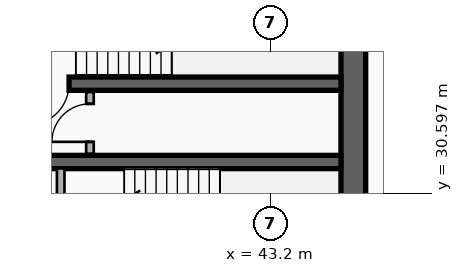
"""IFC4 building model, lengths in metres.
Left out: names, types, materials, properties, quantities, classifications, styles, units other than length and angle.
Written with IfcOpenShell. Run it as: python <this file> out.ifc"""

import sys

from ifc_helpers import new_model, si_unit, direction, frame, frame_2d, origin, place, context, subcontext, project, spatial, rectangle, extrude, element, fill, save


model = new_model("IFC4")
c1 = context("Model", 3, precision=1e-05, world=origin(), true_north=direction((0.0, 1.0)))
c2 = subcontext(c1, "Body", "Model", "MODEL_VIEW")
j1 = project(units=[si_unit("LENGTHUNIT", "METRE"), si_unit("PLANEANGLEUNIT", "RADIAN")], contexts=[c1])
p1 = place(None, origin())
s1 = spatial("IfcSite", under=j1, at=p1, CompositionType="ELEMENT")
p2 = place(p1, origin())
s2 = spatial("IfcBuilding", under=s1, at=p2, CompositionType="ELEMENT")
p3 = place(p2, frame((0.0, 0.0, 118.8)))
s3 = spatial("IfcBuildingStorey", under=s2, at=p3, CompositionType="ELEMENT", Elevation=118.8)
p4 = place(p3, frame((45.38, 28.145, 0.0), z_axis=(0.0, 0.0, 1.0), x_axis=(0.0, 1.0, 0.0)))
e1 = element("IfcWall", 1, at=p4, inside=s3, PredefinedType="SHEAR", context=c2, shape_type="SweptSolid", body=[
    extrude(rectangle(XDim=8.58, YDim=0.65, at=frame_2d((4.29, 0.0))), origin(), (0.0, 0.0, 1.0), 3.5),
])
p5 = place(p3, frame((45.055, 33.48, 0.0), z_axis=(0.0, 0.0, 1.0), x_axis=(-1.0, 0.0, 0.0)))
e2 = element("IfcWall", 2, at=p5, inside=s3, PredefinedType="SHEAR", context=c2, shape_type="SweptSolid", body=[
    extrude(rectangle(XDim=8.5, YDim=0.35, at=frame_2d((4.25, 0.0))), origin(), (0.0, 0.0, 1.0), 3.5),
])
p6 = place(p5, frame((7.155, 0.0, 0.0)))
e3 = element("IfcOpeningElement", 3, at=p6, cuts=e2, PredefinedType="OPENING", context=c2, shape_type="SweptSolid", body=[
    extrude(rectangle(XDim=1.1, YDim=2.15, at=frame_2d((0.55, 1.075))), frame((0.0, 0.185, 0.0), z_axis=(0.0, -1.0, 0.0), x_axis=(1.0, 0.0, 0.0)), (0.0, 0.0, 1.0), 0.37),
])
p7 = place(p3, frame((36.555, 31.42, 0.0), z_axis=(0.0, 0.0, 1.0), x_axis=(1.0, 0.0, 0.0)))
e4 = element("IfcWall", 4, at=p7, inside=s3, PredefinedType="SHEAR", context=c2, shape_type="SweptSolid", body=[
    extrude(rectangle(XDim=8.5, YDim=0.35, at=frame_2d((4.25, 0.0))), origin(), (0.0, 0.0, 1.0), 3.5),
])
p8 = place(p3, frame((37.68, 28.145, 0.0), z_axis=(0.0, 0.0, 1.0), x_axis=(0.0, 1.0, 0.0)))
e5 = element("IfcWall", 5, at=p8, inside=s3, PredefinedType="PARTITIONING", context=c2, shape_type="SweptSolid", body=[
    extrude(rectangle(XDim=3.105, YDim=0.2, at=frame_2d((1.552, 0.0))), origin(), (0.0, 0.0, 1.0), 2.62),
])
p9 = place(p3, frame((38.45, 31.64, 0.0), z_axis=(0.0, 0.0, 1.0), x_axis=(0.0, 1.0, 0.0)))
e6 = element("IfcWall", 6, at=p9, inside=s3, PredefinedType="PARTITIONING", context=c2, shape_type="SweptSolid", body=[
    extrude(rectangle(XDim=1.62, YDim=0.2, at=frame_2d((0.81, 0.0))), origin(), (0.0, 0.0, 1.0), 3.24),
])
p10 = place(p9, frame((0.31, 0.0, 0.0)))
e7 = element("IfcOpeningElement", 7, at=p10, cuts=e6, PredefinedType="OPENING", context=c2, shape_type="SweptSolid", body=[
    extrude(rectangle(XDim=1.0, YDim=2.15, at=frame_2d((0.5, 1.075))), frame((0.0, 0.11, 0.0), z_axis=(0.0, -1.0, 0.0), x_axis=(1.0, 0.0, 0.0)), (0.0, 0.0, 1.0), 0.22),
])
p11 = place(p6, origin())
e8 = element("IfcDoor", 8, at=p11, inside=s3, OperationType="SINGLE_SWING_RIGHT", PredefinedType="DOOR", context=c2, shape_type="SweptSolid", body=[
    extrude(rectangle(XDim=1.1, YDim=2.15, at=frame_2d((0.55, 1.075))), frame((0.0, 0.025, 0.0), z_axis=(0.0, -1.0, 0.0), x_axis=(1.0, 0.0, 0.0)), (0.0, 0.0, 1.0), 0.05),
])
fill(e3, e8)
p12 = place(p10, origin())
e9 = element("IfcDoor", 9, at=p12, inside=s3, OperationType="SINGLE_SWING_LEFT", PredefinedType="DOOR", context=c2, shape_type="SweptSolid", body=[
    extrude(rectangle(XDim=1.0, YDim=2.15, at=frame_2d((0.5, 1.075))), frame((0.0, 0.025, 0.0), z_axis=(0.0, -1.0, 0.0), x_axis=(1.0, 0.0, 0.0)), (0.0, 0.0, 1.0), 0.05),
])
fill(e7, e9)
save(model, sys.argv[1])
